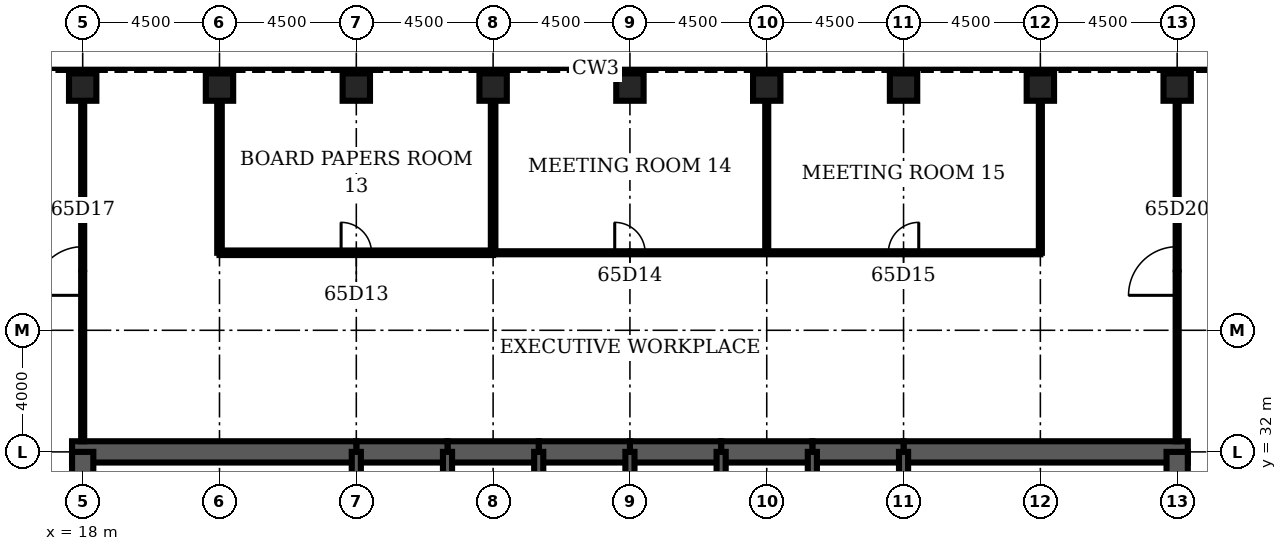
"""IFC4 building model, lengths in metres.
Left out: names, types, materials, properties, quantities, classifications, styles, units other than length and angle.
Written with IfcOpenShell. Run it as: python <this file> out.ifc"""

import sys

from ifc_helpers import new_model, si_unit, direction, frame, frame_2d, origin, origin_2d, place, context, subcontext, project, spatial, rectangle, hollow_rectangle, extrude, element, fill, save


model = new_model("IFC4")
c1 = context("Model", 3, precision=1e-05, world=origin(), true_north=direction((0.0, 1.0)))
c2 = subcontext(c1, "Body", "Model", "MODEL_VIEW")
j1 = project(units=[si_unit("LENGTHUNIT", "METRE"), si_unit("PLANEANGLEUNIT", "RADIAN")], contexts=[c1])
p1 = place(None, origin())
s1 = spatial("IfcSite", under=j1, at=p1, CompositionType="ELEMENT")
p2 = place(p1, origin())
s2 = spatial("IfcBuilding", under=s1, at=p2, CompositionType="ELEMENT")
p3 = place(p2, frame((0.0, 0.0, 287.9)))
s3 = spatial("IfcBuildingStorey", under=s2, at=p3, CompositionType="ELEMENT", Elevation=287.9)
for number, where, z_axis, x_axis in (
    (1, (54.0, 44.0, 0.0), (0.0, 0.0, 1.0), (0.0, 1.0, 0.0)),
    (2, (49.5, 44.0, 0.0), (0.0, 0.0, 1.0), (0.0, 1.0, 0.0)),
    (3, (45.0, 44.0, 0.0), (0.0, 0.0, 1.0), (0.0, 1.0, 0.0)),
    (4, (40.5, 44.0, 0.0), (0.0, 0.0, 1.0), (0.0, 1.0, 0.0)),
    (5, (36.0, 44.0, 0.0), (0.0, 0.0, 1.0), (0.0, 1.0, 0.0)),
    (6, (31.5, 44.0, 0.0), (0.0, 0.0, 1.0), (0.0, 1.0, 0.0)),
    (7, (27.0, 44.0, 0.0), (0.0, 0.0, 1.0), (0.0, 1.0, 0.0)),
    (8, (22.5, 44.0, 0.0), (0.0, 0.0, 1.0), (0.0, 1.0, 0.0)),
    (9, (18.0, 44.0, 0.0), (0.0, 0.0, 1.0), (0.0, 1.0, 0.0)),
):
    element("IfcColumn", number, at=place(p3, frame(where, z_axis=z_axis, x_axis=x_axis)), inside=s3, PredefinedType="COLUMN", context=c2, shape_type="SweptSolid", body=[
        extrude(hollow_rectangle(XDim=0.9, YDim=0.9, WallThickness=0.07, at=origin_2d()), origin(), (0.0, 0.0, 1.0), 4.2),
    ])
p4 = place(p3, frame((54.35, 32.0, 0.0), z_axis=(0.0, 0.0, 1.0), x_axis=(-1.0, 0.0, 0.0)))
e10 = element("IfcWall", 10, at=p4, inside=s3, PredefinedType="SHEAR", context=c2, shape_type="SweptSolid", body=[
    extrude(rectangle(XDim=9.35, YDim=0.7, at=frame_2d((4.675, 0.0))), origin(), (0.0, 0.0, 1.0), 4.2),
])
for number, where, z_axis, x_axis in (
    (11, (45.0, 32.0, 0.0), (0.0, 0.0, 1.0), (-1.0, 0.0, 0.0)),
    (12, (42.0, 32.0, 0.0), (0.0, 0.0, 1.0), (-1.0, 0.0, 0.0)),
    (13, (39.0, 32.0, 0.0), (0.0, 0.0, 1.0), (-1.0, 0.0, 0.0)),
    (14, (36.0, 32.0, 0.0), (0.0, 0.0, 1.0), (-1.0, 0.0, 0.0)),
    (15, (33.0, 32.0, 0.0), (0.0, 0.0, 1.0), (-1.0, 0.0, 0.0)),
    (16, (30.0, 32.0, 0.0), (0.0, 0.0, 1.0), (-1.0, 0.0, 0.0)),
):
    element("IfcWall", number, at=place(p3, frame(where, z_axis=z_axis, x_axis=x_axis)), inside=s3, PredefinedType="SHEAR", context=c2, shape_type="SweptSolid", body=[
        extrude(rectangle(XDim=3.0, YDim=0.7, at=frame_2d((1.5, 0.0))), origin(), (0.0, 0.0, 1.0), 4.2),
    ])
p5 = place(p3, frame((27.0, 32.0, 0.0), z_axis=(0.0, 0.0, 1.0), x_axis=(-1.0, 0.0, 0.0)))
e17 = element("IfcWall", 17, at=p5, inside=s3, PredefinedType="SHEAR", context=c2, shape_type="SweptSolid", body=[
    extrude(rectangle(XDim=9.35, YDim=0.7, at=frame_2d((4.675, 0.0))), origin(), (0.0, 0.0, 1.0), 4.2),
])
for number, where, z_axis, x_axis in (
    (18, (18.0, 32.0, 0.0), (0.0, 0.0, 1.0), (0.0, -1.0, 0.0)),
    (19, (54.0, 28.8, 0.0), (0.0, 0.0, 1.0), (0.0, 1.0, 0.0)),
):
    element("IfcWall", number, at=place(p3, frame(where, z_axis=z_axis, x_axis=x_axis)), inside=s3, PredefinedType="SHEAR", context=c2, shape_type="SweptSolid", body=[
        extrude(rectangle(XDim=3.2, YDim=0.7, at=frame_2d((1.6, 0.0))), origin(), (0.0, 0.0, 1.0), 4.2),
    ])
for number, where, z_axis, x_axis in (
    (20, (27.0, 28.8, 0.0), (0.0, 0.0, 1.0), (0.0, 1.0, 0.0)),
    (21, (30.0, 28.8, 0.0), (0.0, 0.0, 1.0), (0.0, 1.0, 0.0)),
    (22, (33.0, 28.8, 0.0), (0.0, 0.0, 1.0), (0.0, 1.0, 0.0)),
    (23, (36.0, 28.8, 0.0), (0.0, 0.0, 1.0), (0.0, 1.0, 0.0)),
    (24, (39.0, 28.8, 0.0), (0.0, 0.0, 1.0), (0.0, 1.0, 0.0)),
    (25, (42.0, 28.8, 0.0), (0.0, 0.0, 1.0), (0.0, 1.0, 0.0)),
    (26, (45.0, 28.8, 0.0), (0.0, 0.0, 1.0), (0.0, 1.0, 0.0)),
):
    element("IfcWall", number, at=place(p3, frame(where, z_axis=z_axis, x_axis=x_axis)), inside=s3, PredefinedType="SOLIDWALL", context=c2, shape_type="SweptSolid", body=[
        extrude(rectangle(XDim=3.2, YDim=0.3, at=frame_2d((1.6, 0.0))), origin(), (0.0, 0.0, 1.0), 4.2),
    ])
p6 = place(p3, frame((22.5, 38.55, 0.0), z_axis=(0.0, 0.0, 1.0), x_axis=(1.0, 0.0, 0.0)))
e27 = element("IfcWall", 27, at=p6, inside=s3, PredefinedType="PARTITIONING", context=c2, shape_type="SweptSolid", body=[
    extrude(rectangle(XDim=9.0, YDim=0.15, at=frame_2d((4.5, 0.0))), origin(), (0.0, 0.0, 1.0), 3.0),
])
p7 = place(p6, frame((4.0, 0.0, 0.0)))
e28 = element("IfcOpeningElement", 28, at=p7, cuts=e27, PredefinedType="OPENING", context=c2, shape_type="SweptSolid", body=[
    extrude(rectangle(XDim=1.0, YDim=2.1, at=frame_2d((0.5, 1.05))), frame((0.0, 0.085, 0.0), z_axis=(0.0, -1.0, 0.0), x_axis=(1.0, 0.0, 0.0)), (0.0, 0.0, 1.0), 0.17),
])
p8 = place(p3, frame((31.5, 38.55, 0.0), z_axis=(0.0, 0.0, 1.0), x_axis=(1.0, 0.0, 0.0)))
e29 = element("IfcWall", 29, at=p8, inside=s3, PredefinedType="PARTITIONING", context=c2, shape_type="SweptSolid", body=[
    extrude(rectangle(XDim=18.0, YDim=0.1, at=frame_2d((9.0, 0.0))), origin(), (0.0, 0.0, 1.0), 3.0),
])
p9 = place(p8, frame((4.0, 0.0, 0.0)))
e30 = element("IfcOpeningElement", 30, at=p9, cuts=e29, PredefinedType="OPENING", context=c2, shape_type="SweptSolid", body=[
    extrude(rectangle(XDim=1.0, YDim=2.1, at=frame_2d((0.5, 1.05))), frame((0.0, 0.06, 0.0), z_axis=(0.0, -1.0, 0.0), x_axis=(1.0, 0.0, 0.0)), (0.0, 0.0, 1.0), 0.12),
])
p10 = place(p8, frame((13.0, 0.0, 0.0)))
e31 = element("IfcOpeningElement", 31, at=p10, cuts=e29, PredefinedType="OPENING", context=c2, shape_type="SweptSolid", body=[
    extrude(rectangle(XDim=1.0, YDim=2.1, at=frame_2d((0.5, 1.05))), frame((0.0, 0.06, 0.0), z_axis=(0.0, -1.0, 0.0), x_axis=(1.0, 0.0, 0.0)), (0.0, 0.0, 1.0), 0.12),
])
p11 = place(p3, frame((18.0, 32.35, 0.0), z_axis=(0.0, 0.0, 1.0), x_axis=(0.0, 1.0, 0.0)))
e32 = element("IfcWall", 32, at=p11, inside=s3, PredefinedType="PARTITIONING", context=c2, shape_type="SweptSolid", body=[
    extrude(rectangle(XDim=11.2, YDim=0.1, at=frame_2d((5.6, 0.0))), origin(), (0.0, 0.0, 1.0), 3.0),
])
p12 = place(p11, frame((4.8, 0.0, 0.0)))
e33 = element("IfcOpeningElement", 33, at=p12, cuts=e32, PredefinedType="OPENING", context=c2, shape_type="SweptSolid", body=[
    extrude(rectangle(XDim=1.6, YDim=2.1, at=frame_2d((0.8, 1.05))), frame((0.0, 0.06, 0.0), z_axis=(0.0, -1.0, 0.0), x_axis=(1.0, 0.0, 0.0)), (0.0, 0.0, 1.0), 0.12),
])
for number, where, z_axis, x_axis in (
    (34, (22.5, 38.55, 0.0), (0.0, 0.0, 1.0), (0.0, 1.0, 0.0)),
    (35, (31.5, 38.55, 0.0), (0.0, 0.0, 1.0), (0.0, 1.0, 0.0)),
):
    element("IfcWall", number, at=place(p3, frame(where, z_axis=z_axis, x_axis=x_axis)), inside=s3, PredefinedType="PARTITIONING", context=c2, shape_type="SweptSolid", body=[
        extrude(rectangle(XDim=5.0, YDim=0.15, at=frame_2d((2.5, 0.0))), origin(), (0.0, 0.0, 1.0), 3.0),
    ])
for number, where, z_axis, x_axis in (
    (36, (40.5, 38.55, 0.0), (0.0, 0.0, 1.0), (0.0, 1.0, 0.0)),
    (37, (49.5, 38.55, 0.0), (0.0, 0.0, 1.0), (0.0, 1.0, 0.0)),
):
    element("IfcWall", number, at=place(p3, frame(where, z_axis=z_axis, x_axis=x_axis)), inside=s3, PredefinedType="PARTITIONING", context=c2, shape_type="SweptSolid", body=[
        extrude(rectangle(XDim=5.0, YDim=0.1, at=frame_2d((2.5, 0.0))), origin(), (0.0, 0.0, 1.0), 3.0),
    ])
p13 = place(p3, frame((54.0, 32.35, 0.0), z_axis=(0.0, 0.0, 1.0), x_axis=(0.0, 1.0, 0.0)))
e38 = element("IfcWall", 38, at=p13, inside=s3, PredefinedType="PARTITIONING", context=c2, shape_type="SweptSolid", body=[
    extrude(rectangle(XDim=11.2, YDim=0.1, at=frame_2d((5.6, 0.0))), origin(), (0.0, 0.0, 1.0), 3.0),
])
p14 = place(p13, frame((4.8, 0.0, 0.0)))
e39 = element("IfcOpeningElement", 39, at=p14, cuts=e38, PredefinedType="OPENING", context=c2, shape_type="SweptSolid", body=[
    extrude(rectangle(XDim=1.6, YDim=2.1, at=frame_2d((0.8, 1.05))), frame((0.0, 0.06, 0.0), z_axis=(0.0, -1.0, 0.0), x_axis=(1.0, 0.0, 0.0)), (0.0, 0.0, 1.0), 0.12),
])
p15 = place(p7, origin())
e40 = element("IfcDoor", 40, at=p15, inside=s3, OperationType="SINGLE_SWING_LEFT", PredefinedType="DOOR", context=c2, shape_type="SweptSolid", body=[
    extrude(rectangle(XDim=1.0, YDim=2.1, at=frame_2d((0.5, 1.05))), frame((0.0, 0.025, 0.0), z_axis=(0.0, -1.0, 0.0), x_axis=(1.0, 0.0, 0.0)), (0.0, 0.0, 1.0), 0.05),
])
fill(e28, e40)
p16 = place(p9, origin())
e41 = element("IfcDoor", 41, at=p16, inside=s3, OperationType="SINGLE_SWING_LEFT", PredefinedType="DOOR", context=c2, shape_type="SweptSolid", body=[
    extrude(rectangle(XDim=1.0, YDim=2.1, at=frame_2d((0.5, 1.05))), frame((0.0, 0.025, 0.0), z_axis=(0.0, -1.0, 0.0), x_axis=(1.0, 0.0, 0.0)), (0.0, 0.0, 1.0), 0.05),
])
fill(e30, e41)
p17 = place(p10, origin())
e42 = element("IfcDoor", 42, at=p17, inside=s3, OperationType="SINGLE_SWING_RIGHT", PredefinedType="DOOR", context=c2, shape_type="SweptSolid", body=[
    extrude(rectangle(XDim=1.0, YDim=2.1, at=frame_2d((0.5, 1.05))), frame((0.0, 0.025, 0.0), z_axis=(0.0, -1.0, 0.0), x_axis=(1.0, 0.0, 0.0)), (0.0, 0.0, 1.0), 0.05),
])
fill(e31, e42)
p18 = place(p12, origin())
e43 = element("IfcDoor", 43, at=p18, inside=s3, OperationType="SINGLE_SWING_LEFT", PredefinedType="DOOR", context=c2, shape_type="SweptSolid", body=[
    extrude(rectangle(XDim=1.6, YDim=2.1, at=frame_2d((0.8, 1.05))), frame((0.0, 0.025, 0.0), z_axis=(0.0, -1.0, 0.0), x_axis=(1.0, 0.0, 0.0)), (0.0, 0.0, 1.0), 0.05),
])
fill(e33, e43)
p19 = place(p14, origin())
e44 = element("IfcDoor", 44, at=p19, inside=s3, OperationType="SINGLE_SWING_LEFT", PredefinedType="DOOR", context=c2, shape_type="SweptSolid", body=[
    extrude(rectangle(XDim=1.6, YDim=2.1, at=frame_2d((0.8, 1.05))), frame((0.0, 0.025, 0.0), z_axis=(0.0, -1.0, 0.0), x_axis=(1.0, 0.0, 0.0)), (0.0, 0.0, 1.0), 0.05),
])
fill(e39, e44)
save(model, sys.argv[1])
